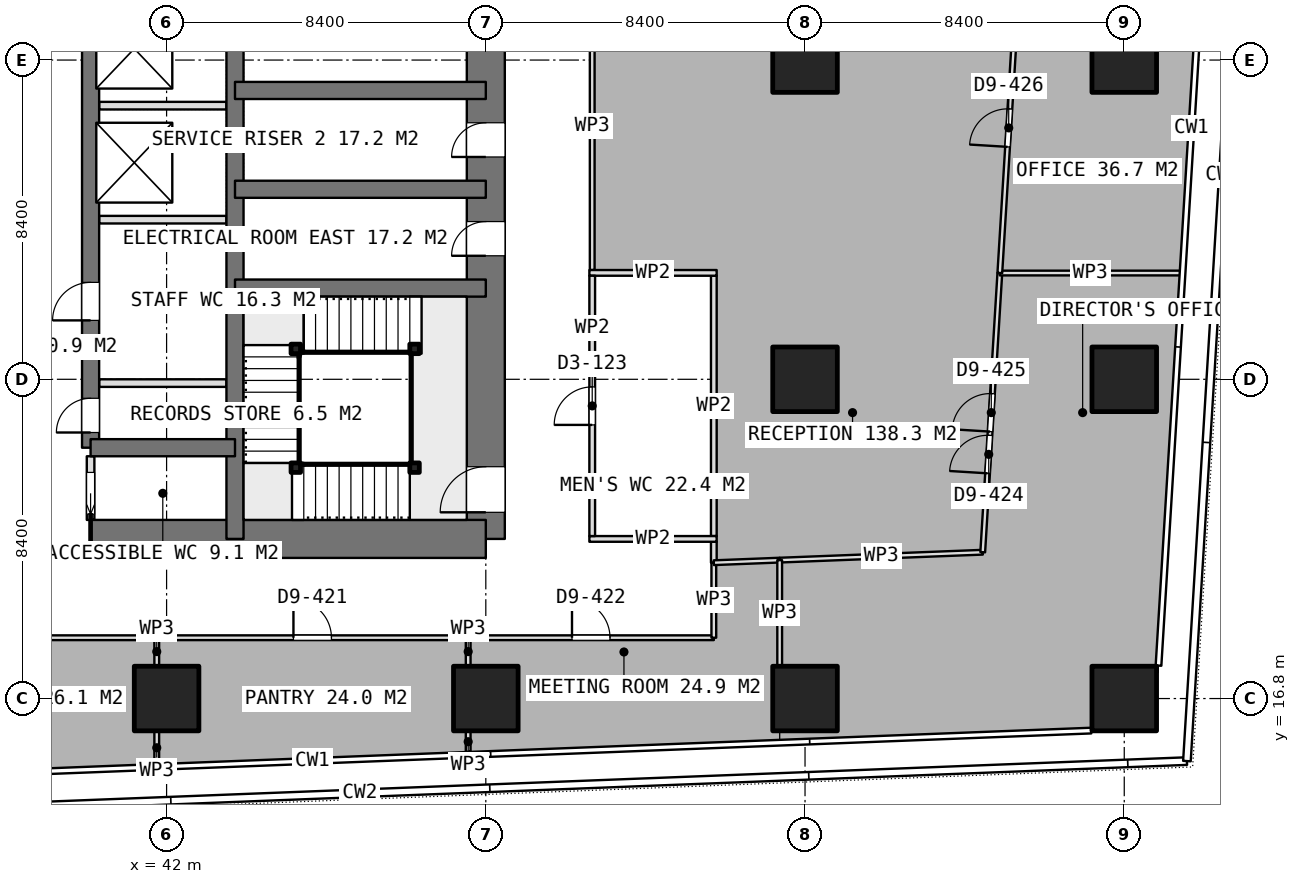
"""IFC4 building model, lengths in metres.
Left out: names, types, materials, properties, quantities, classifications, styles, units other than length and angle.
Written with IfcOpenShell. Run it as: python <this file> out.ifc"""

import sys

from ifc_helpers import new_model, si_unit, direction, frame, frame_2d, origin, origin_2d, place, context, subcontext, project, spatial, rectangle, extrude, element, fill, save


model = new_model("IFC4")
c1 = context("Model", 3, precision=1e-05, world=origin(), true_north=direction((0.0, 1.0)))
c2 = subcontext(c1, "Body", "Model", "MODEL_VIEW")
j1 = project(units=[si_unit("LENGTHUNIT", "METRE"), si_unit("PLANEANGLEUNIT", "RADIAN")], contexts=[c1])
p1 = place(None, origin())
s1 = spatial("IfcSite", under=j1, at=p1, CompositionType="ELEMENT")
p2 = place(p1, origin())
s2 = spatial("IfcBuilding", under=s1, at=p2, CompositionType="ELEMENT")
p3 = place(p2, frame((0.0, 0.0, 117.8)))
s3 = spatial("IfcBuildingStorey", under=s2, at=p3, CompositionType="ELEMENT", Elevation=117.8)
p4 = place(p3, frame((40.0, 21.0, 0.0), z_axis=(0.0, 0.0, 1.0), x_axis=(1.0, 0.0, 0.0)))
e1 = element("IfcWall", 1, at=p4, inside=s3, PredefinedType="SHEAR", context=c2, shape_type="SweptSolid", body=[
    extrude(rectangle(XDim=10.4, YDim=1.0, at=frame_2d((5.2, 0.0))), origin(), (0.0, 0.0, 1.0), 3.75),
])
p5 = place(p3, frame((50.4, 21.0, 0.0), z_axis=(0.0, 0.0, 1.0), x_axis=(0.0, 1.0, 0.0)))
e2 = element("IfcWall", 2, at=p5, inside=s3, PredefinedType="SHEAR", context=c2, shape_type="SweptSolid", body=[
    extrude(rectangle(XDim=25.2, YDim=1.0, at=frame_2d((12.6, 0.0))), origin(), (0.0, 0.0, 1.0), 3.75),
])
p6 = place(p5, frame((16.2, 0.0, 0.0)))
e3 = element("IfcOpeningElement", 3, at=p6, cuts=e2, PredefinedType="OPENING", context=c2, shape_type="SweptSolid", body=[
    extrude(rectangle(XDim=1.2, YDim=2.1, at=frame_2d((0.6, 1.05))), frame((0.0, 0.51, 0.0), z_axis=(0.0, -1.0, 0.0), x_axis=(1.0, 0.0, 0.0)), (0.0, 0.0, 1.0), 1.02),
])
p7 = place(p5, frame((10.05, 0.0, 0.0)))
e4 = element("IfcOpeningElement", 4, at=p7, cuts=e2, PredefinedType="OPENING", context=c2, shape_type="SweptSolid", body=[
    extrude(rectangle(XDim=0.9, YDim=2.1, at=frame_2d((0.45, 1.05))), frame((0.0, 0.51, 0.0), z_axis=(0.0, -1.0, 0.0), x_axis=(1.0, 0.0, 0.0)), (0.0, 0.0, 1.0), 1.02),
])
p8 = place(p5, frame((7.45, 0.0, 0.0)))
e5 = element("IfcOpeningElement", 5, at=p8, cuts=e2, PredefinedType="OPENING", context=c2, shape_type="SweptSolid", body=[
    extrude(rectangle(XDim=0.9, YDim=2.1, at=frame_2d((0.45, 1.05))), frame((0.0, 0.51, 0.0), z_axis=(0.0, -1.0, 0.0), x_axis=(1.0, 0.0, 0.0)), (0.0, 0.0, 1.0), 1.02),
])
p9 = place(p5, frame((0.7, 0.0, 0.0)))
e6 = element("IfcOpeningElement", 6, at=p9, cuts=e2, PredefinedType="OPENING", context=c2, shape_type="SweptSolid", body=[
    extrude(rectangle(XDim=1.2, YDim=2.1, at=frame_2d((0.6, 1.05))), frame((0.0, 0.51, 0.0), z_axis=(0.0, -1.0, 0.0), x_axis=(1.0, 0.0, 0.0)), (0.0, 0.0, 1.0), 1.02),
])
p10 = place(p3, frame((43.8, 21.0, 0.0), z_axis=(0.0, 0.0, 1.0), x_axis=(0.0, 1.0, 0.0)))
e7 = element("IfcWall", 7, at=p10, inside=s3, PredefinedType="SHEAR", context=c2, shape_type="SweptSolid", body=[
    extrude(rectangle(XDim=25.2, YDim=0.45, at=frame_2d((12.6, 0.0))), origin(), (0.0, 0.0, 1.0), 3.75),
])
p11 = place(p3, frame((40.0, 23.4, 0.0), z_axis=(0.0, 0.0, 1.0), x_axis=(0.0, 1.0, 0.0)))
e8 = element("IfcWall", 8, at=p11, inside=s3, PredefinedType="SHEAR", context=c2, shape_type="SweptSolid", body=[
    extrude(rectangle(XDim=18.0, YDim=0.45, at=frame_2d((9.0, 0.0))), origin(), (0.0, 0.0, 1.0), 3.75),
])
p12 = place(p11, frame((0.4, 0.0, 0.0)))
e9 = element("IfcOpeningElement", 9, at=p12, cuts=e8, PredefinedType="OPENING", context=c2, shape_type="SweptSolid", body=[
    extrude(rectangle(XDim=0.9, YDim=2.1, at=frame_2d((0.45, 1.05))), frame((0.0, 0.235, 0.0), z_axis=(0.0, -1.0, 0.0), x_axis=(1.0, 0.0, 0.0)), (0.0, 0.0, 1.0), 0.47),
])
p13 = place(p11, frame((3.35, 0.0, 0.0)))
e10 = element("IfcOpeningElement", 10, at=p13, cuts=e8, PredefinedType="OPENING", context=c2, shape_type="SweptSolid", body=[
    extrude(rectangle(XDim=1.0, YDim=2.1, at=frame_2d((0.5, 1.05))), frame((0.0, 0.235, 0.0), z_axis=(0.0, -1.0, 0.0), x_axis=(1.0, 0.0, 0.0)), (0.0, 0.0, 1.0), 0.47),
])
p14 = place(p3, frame((40.0, 23.4, 0.0), z_axis=(0.0, 0.0, 1.0), x_axis=(1.0, 0.0, 0.0)))
e11 = element("IfcWall", 11, at=p14, inside=s3, PredefinedType="SHEAR", context=c2, shape_type="SweptSolid", body=[
    extrude(rectangle(XDim=3.8, YDim=0.45, at=frame_2d((1.9, 0.0))), origin(), (0.0, 0.0, 1.0), 3.75),
])
for number, where, z_axis, x_axis in (
    (12, (43.8, 27.6, 0.0), (0.0, 0.0, 1.0), (1.0, 0.0, 0.0)),
    (13, (43.8, 30.2, 0.0), (0.0, 0.0, 1.0), (1.0, 0.0, 0.0)),
    (14, (43.8, 32.8, 0.0), (0.0, 0.0, 1.0), (1.0, 0.0, 0.0)),
):
    element("IfcWall", number, at=place(p3, frame(where, z_axis=z_axis, x_axis=x_axis)), inside=s3, PredefinedType="SHEAR", context=c2, shape_type="SweptSolid", body=[
        extrude(rectangle(XDim=6.6, YDim=0.45, at=frame_2d((3.3, 0.0))), origin(), (0.0, 0.0, 1.0), 3.75),
    ])
for number, where, z_axis, x_axis in (
    (15, (42.0, 16.8, 0.0), (0.0, 0.0, 1.0), (1.0, 0.0, 0.0)),
    (16, (50.4, 16.8, 0.0), (0.0, 0.0, 1.0), (1.0, 0.0, 0.0)),
    (17, (58.8, 16.8, 0.0), (0.0, 0.0, 1.0), (1.0, 0.0, 0.0)),
    (18, (58.8, 25.2, 0.0), (0.0, 0.0, 1.0), (1.0, 0.0, 0.0)),
    (19, (58.8, 33.6, 0.0), (0.0, 0.0, 1.0), (1.0, 0.0, 0.0)),
    (20, (67.2, 16.8, 0.0), (0.0, 0.0, 1.0), (1.0, 0.0, 0.0)),
    (21, (67.2, 25.2, 0.0), (0.0, 0.0, 1.0), (1.0, 0.0, 0.0)),
    (22, (67.2, 33.6, 0.0), (0.0, 0.0, 1.0), (1.0, 0.0, 0.0)),
):
    element("IfcColumn", number, at=place(p3, frame(where, z_axis=z_axis, x_axis=x_axis)), inside=s3, PredefinedType="COLUMN", context=c2, shape_type="SweptSolid", body=[
        extrude(rectangle(XDim=1.7, YDim=1.7, at=origin_2d()), origin(), (0.0, 0.0, 1.0), 3.75),
    ])
for number, where, z_axis, x_axis in (
    (23, (40.225, 29.4, 0.0), (0.0, 0.0, 1.0), (1.0, 0.0, 0.0)),
    (24, (40.225, 32.4, 0.0), (0.0, 0.0, 1.0), (1.0, 0.0, 0.0)),
):
    element("IfcWall", number, at=place(p3, frame(where, z_axis=z_axis, x_axis=x_axis)), inside=s3, PredefinedType="PARTITIONING", context=c2, shape_type="SweptSolid", body=[
        extrude(rectangle(XDim=3.35, YDim=0.2, at=frame_2d((1.675, 0.0))), origin(), (0.0, 0.0, 1.0), 3.5),
    ])
p15 = place(p3, frame((40.0, 21.5, 0.0), z_axis=(0.0, 0.0, 1.0), x_axis=(0.0, 1.0, 0.0)))
e25 = element("IfcWall", 25, at=p15, inside=s3, PredefinedType="PARTITIONING", context=c2, shape_type="SweptSolid", body=[
    extrude(rectangle(XDim=1.675, YDim=0.2, at=frame_2d((0.837, 0.0))), origin(), (0.0, 0.0, 1.0), 3.5),
])
p16 = place(p15, frame((0.15, 0.0, 0.0)))
e26 = element("IfcOpeningElement", 26, at=p16, cuts=e25, PredefinedType="OPENING", context=c2, shape_type="SweptSolid", body=[
    extrude(rectangle(XDim=1.1, YDim=2.1, at=frame_2d((0.55, 1.05))), frame((0.0, 0.11, 0.0), z_axis=(0.0, -1.0, 0.0), x_axis=(1.0, 0.0, 0.0)), (0.0, 0.0, 1.0), 0.22),
])
p17 = place(p3, frame((40.225, 25.1, 0.0), z_axis=(0.0, 0.0, 1.0), x_axis=(1.0, 0.0, 0.0)))
e27 = element("IfcWall", 27, at=p17, inside=s3, PredefinedType="PARTITIONING", context=c2, shape_type="SweptSolid", body=[
    extrude(rectangle(XDim=3.35, YDim=0.2, at=frame_2d((1.675, 0.0))), origin(), (0.0, 0.0, 1.0), 3.5),
])
for number, where, z_axis, x_axis in (
    (28, (53.125, 21.0, 0.0), (0.0, 0.0, 1.0), (1.0, 0.0, 0.0)),
    (29, (53.125, 28.0, 0.0), (0.0, 0.0, 1.0), (1.0, 0.0, 0.0)),
):
    element("IfcWall", number, at=place(p3, frame(where, z_axis=z_axis, x_axis=x_axis)), inside=s3, PredefinedType="PARTITIONING", context=c2, shape_type="SweptSolid", body=[
        extrude(rectangle(XDim=3.35, YDim=0.15, at=frame_2d((1.675, 0.0))), origin(), (0.0, 0.0, 1.0), 3.5),
    ])
p18 = place(p3, frame((53.2, 21.075, 0.0), z_axis=(0.0, 0.0, 1.0), x_axis=(0.0, 1.0, 0.0)))
e30 = element("IfcWall", 30, at=p18, inside=s3, PredefinedType="PARTITIONING", context=c2, shape_type="SweptSolid", body=[
    extrude(rectangle(XDim=6.85, YDim=0.15, at=frame_2d((3.425, 0.0))), origin(), (0.0, 0.0, 1.0), 3.5),
])
p19 = place(p18, frame((2.925, 0.0, 0.0)))
e31 = element("IfcOpeningElement", 31, at=p19, cuts=e30, PredefinedType="OPENING", context=c2, shape_type="SweptSolid", body=[
    extrude(rectangle(XDim=1.0, YDim=2.1, at=frame_2d((0.5, 1.05))), frame((0.0, 0.085, 0.0), z_axis=(0.0, -1.0, 0.0), x_axis=(1.0, 0.0, 0.0)), (0.0, 0.0, 1.0), 0.17),
])
p20 = place(p3, frame((56.4, 21.075, 0.0), z_axis=(0.0, 0.0, 1.0), x_axis=(0.0, 1.0, 0.0)))
e32 = element("IfcWall", 32, at=p20, inside=s3, PredefinedType="PARTITIONING", context=c2, shape_type="SweptSolid", body=[
    extrude(rectangle(XDim=6.85, YDim=0.15, at=frame_2d((3.425, 0.0))), origin(), (0.0, 0.0, 1.0), 3.5),
])
p21 = place(p3, frame((41.741, 18.4, 0.0), z_axis=(0.0, 0.0, 1.0), x_axis=(1.0, 0.0, 0.0)))
e33 = element("IfcWall", 33, at=p21, inside=s3, PredefinedType="PARTITIONING", context=c2, shape_type="SweptSolid", body=[
    extrude(rectangle(XDim=8.195, YDim=0.125, at=frame_2d((4.098, 0.0))), origin(), (0.0, 0.0, 1.0), 3.5),
])
p22 = place(p21, frame((3.597, 0.0, 0.0)))
e34 = element("IfcOpeningElement", 34, at=p22, cuts=e33, PredefinedType="OPENING", context=c2, shape_type="SweptSolid", body=[
    extrude(rectangle(XDim=1.0, YDim=2.1, at=frame_2d((0.5, 1.05))), frame((0.0, 0.073, 0.0), z_axis=(0.0, -1.0, 0.0), x_axis=(1.0, 0.0, 0.0)), (0.0, 0.0, 1.0), 0.145),
])
p23 = place(p3, frame((49.936, 18.4, 0.0), z_axis=(0.0, 0.0, 1.0), x_axis=(0.0, -1.0, 0.0)))
e35 = element("IfcWall", 35, at=p23, inside=s3, PredefinedType="PARTITIONING", context=c2, shape_type="SweptSolid", body=[
    extrude(rectangle(XDim=0.73, YDim=0.125, at=frame_2d((0.365, 0.0))), origin(), (0.0, 0.0, 1.0), 3.5),
])
p24 = place(p3, frame((49.936, 15.93, 0.0), z_axis=(0.0, 0.0, 1.0), x_axis=(0.0, -1.0, 0.0)))
e36 = element("IfcWall", 36, at=p24, inside=s3, PredefinedType="PARTITIONING", context=c2, shape_type="SweptSolid", body=[
    extrude(rectangle(XDim=0.531, YDim=0.125, at=frame_2d((0.266, 0.0))), origin(), (0.0, 0.0, 1.0), 3.5),
])
p25 = place(p3, frame((41.741, 15.08, 0.0), z_axis=(0.0, 0.0, 1.0), x_axis=(0.0, 1.0, 0.0)))
e37 = element("IfcWall", 37, at=p25, inside=s3, PredefinedType="PARTITIONING", context=c2, shape_type="SweptSolid", body=[
    extrude(rectangle(XDim=0.85, YDim=0.125, at=frame_2d((0.425, 0.0))), origin(), (0.0, 0.0, 1.0), 3.5),
])
p26 = place(p3, frame((41.741, 17.67, 0.0), z_axis=(0.0, 0.0, 1.0), x_axis=(0.0, 1.0, 0.0)))
e38 = element("IfcWall", 38, at=p26, inside=s3, PredefinedType="PARTITIONING", context=c2, shape_type="SweptSolid", body=[
    extrude(rectangle(XDim=0.73, YDim=0.125, at=frame_2d((0.365, 0.0))), origin(), (0.0, 0.0, 1.0), 3.5),
])
p27 = place(p3, frame((49.937, 18.4, 0.0), z_axis=(0.0, 0.0, 1.0), x_axis=(1.0, 0.0, 0.0)))
e39 = element("IfcWall", 39, at=p27, inside=s3, PredefinedType="PARTITIONING", context=c2, shape_type="SweptSolid", body=[
    extrude(rectangle(XDim=6.463, YDim=0.125, at=frame_2d((3.231, 0.0))), origin(), (0.0, 0.0, 1.0), 3.5),
])
p28 = place(p27, frame((2.731, 0.0, 0.0)))
e40 = element("IfcOpeningElement", 40, at=p28, cuts=e39, PredefinedType="OPENING", context=c2, shape_type="SweptSolid", body=[
    extrude(rectangle(XDim=1.0, YDim=2.1, at=frame_2d((0.5, 1.05))), frame((0.0, 0.073, 0.0), z_axis=(0.0, -1.0, 0.0), x_axis=(1.0, 0.0, 0.0)), (0.0, 0.0, 1.0), 0.145),
])
p29 = place(p3, frame((56.4, 18.4, 0.0), z_axis=(0.0, 0.0, 1.0), x_axis=(0.0, 1.0, 0.0)))
e41 = element("IfcWall", 41, at=p29, inside=s3, PredefinedType="PARTITIONING", context=c2, shape_type="SweptSolid", body=[
    extrude(rectangle(XDim=1.974, YDim=0.125, at=frame_2d((0.987, 0.0))), origin(), (0.0, 0.0, 1.0), 3.5),
])
p30 = place(p3, frame((56.4, 20.374, 0.0), z_axis=(0.0, 0.0, 1.0), x_axis=(0.999234110548, 0.039130452561, 0.0)))
e42 = element("IfcWall", 42, at=p30, inside=s3, PredefinedType="PARTITIONING", context=c2, shape_type="SweptSolid", body=[
    extrude(rectangle(XDim=1.734, YDim=0.125, at=frame_2d((0.867, 0.0))), origin(), (0.0, 0.0, 1.0), 3.5),
])
p31 = place(p3, frame((58.133, 20.442, 0.0), z_axis=(0.0, 0.0, 1.0), x_axis=(0.0, -1.0, 0.0)))
e43 = element("IfcWall", 43, at=p31, inside=s3, PredefinedType="PARTITIONING", context=c2, shape_type="SweptSolid", body=[
    extrude(rectangle(XDim=2.772, YDim=0.125, at=frame_2d((1.386, 0.0))), origin(), (0.0, 0.0, 1.0), 3.5),
])
p32 = place(p3, frame((58.134, 20.442, 0.0), z_axis=(0.0, 0.0, 1.0), x_axis=(0.999242781249, 0.03890840682, 0.0)))
e44 = element("IfcWall", 44, at=p32, inside=s3, PredefinedType="PARTITIONING", context=c2, shape_type="SweptSolid", body=[
    extrude(rectangle(XDim=5.346, YDim=0.125, at=frame_2d((2.673, 0.0))), origin(), (0.0, 0.0, 1.0), 3.5),
])
p33 = place(p3, frame((63.476, 20.65, 0.0), z_axis=(0.0, 0.0, 1.0), x_axis=(0.061135017565, 0.998129505439, 0.0)))
e45 = element("IfcWall", 45, at=p33, inside=s3, PredefinedType="PARTITIONING", context=c2, shape_type="SweptSolid", body=[
    extrude(rectangle(XDim=7.36, YDim=0.125, at=frame_2d((3.68, 0.0))), origin(), (0.0, 0.0, 1.0), 3.5),
])
p34 = place(p33, frame((3.18, 0.0, 0.0)))
e46 = element("IfcOpeningElement", 46, at=p34, cuts=e45, PredefinedType="OPENING", context=c2, shape_type="SweptSolid", body=[
    extrude(rectangle(XDim=1.0, YDim=2.1, at=frame_2d((0.5, 1.05))), frame((0.0, 0.073, 0.0), z_axis=(0.0, -1.0, 0.0), x_axis=(1.0, 0.0, 0.0)), (0.0, 0.0, 1.0), 0.145),
])
p35 = place(p33, frame((2.08, 0.0, 0.0)))
e47 = element("IfcOpeningElement", 47, at=p35, cuts=e45, PredefinedType="OPENING", context=c2, shape_type="SweptSolid", body=[
    extrude(rectangle(XDim=1.0, YDim=2.1, at=frame_2d((0.5, 1.05))), frame((0.0, 0.073, 0.0), z_axis=(0.0, -1.0, 0.0), x_axis=(1.0, 0.0, 0.0)), (0.0, 0.0, 1.0), 0.145),
])
p36 = place(p3, frame((63.926, 27.996, 0.0), z_axis=(0.0, 0.0, 1.0), x_axis=(1.0, 0.0, 0.0)))
e48 = element("IfcWall", 48, at=p36, inside=s3, PredefinedType="PARTITIONING", context=c2, shape_type="SweptSolid", body=[
    extrude(rectangle(XDim=4.758, YDim=0.125, at=frame_2d((2.379, 0.0))), origin(), (0.0, 0.0, 1.0), 3.5),
])
p37 = place(p3, frame((63.926, 27.997, 0.0), z_axis=(0.0, 0.0, 1.0), x_axis=(0.061176245149, 0.998126979412, 0.0)))
e49 = element("IfcWall", 49, at=p37, inside=s3, PredefinedType="PARTITIONING", context=c2, shape_type="SweptSolid", body=[
    extrude(rectangle(XDim=7.65, YDim=0.125, at=frame_2d((3.825, 0.0))), origin(), (0.0, 0.0, 1.0), 3.5),
])
p38 = place(p37, frame((3.325, 0.0, 0.0)))
e50 = element("IfcOpeningElement", 50, at=p38, cuts=e49, PredefinedType="OPENING", context=c2, shape_type="SweptSolid", body=[
    extrude(rectangle(XDim=1.0, YDim=2.1, at=frame_2d((0.5, 1.05))), frame((0.0, 0.073, 0.0), z_axis=(0.0, -1.0, 0.0), x_axis=(1.0, 0.0, 0.0)), (0.0, 0.0, 1.0), 0.145),
])
p39 = place(p3, frame((53.2, 28.075, 0.0), z_axis=(0.0, 0.0, 1.0), x_axis=(0.0, 1.0, 0.0)))
e51 = element("IfcWall", 51, at=p39, inside=s3, PredefinedType="PARTITIONING", context=c2, shape_type="SweptSolid", body=[
    extrude(rectangle(XDim=7.558, YDim=0.125, at=frame_2d((3.779, 0.0))), origin(), (0.0, 0.0, 1.0), 3.5),
])
p40 = place(p3, frame((56.4, 20.374, 0.0), z_axis=(0.0, 0.0, 1.0), x_axis=(0.0, 1.0, 0.0)))
e52 = element("IfcWall", 52, at=p40, inside=s3, PredefinedType="PARTITIONING", context=c2, shape_type="SweptSolid", body=[
    extrude(rectangle(XDim=0.551, YDim=0.15, at=frame_2d((0.275, 0.0))), origin(), (0.0, 0.0, 1.0), 3.5),
])
p41 = place(p3, frame((33.826, 18.4, 0.0), z_axis=(0.0, 0.0, 1.0), x_axis=(1.0, 0.0, 0.0)))
e53 = element("IfcWall", 53, at=p41, inside=s3, PredefinedType="PARTITIONING", context=c2, shape_type="SweptSolid", body=[
    extrude(rectangle(XDim=7.914, YDim=0.125, at=frame_2d((3.957, 0.0))), origin(), (0.0, 0.0, 1.0), 3.5),
])
p42 = place(p41, frame((3.457, 0.0, 0.0)))
e54 = element("IfcOpeningElement", 54, at=p42, cuts=e53, PredefinedType="OPENING", context=c2, shape_type="SweptSolid", body=[
    extrude(rectangle(XDim=1.0, YDim=2.1, at=frame_2d((0.5, 1.05))), frame((0.0, 0.073, 0.0), z_axis=(0.0, -1.0, 0.0), x_axis=(1.0, 0.0, 0.0)), (0.0, 0.0, 1.0), 0.145),
])
for number, where, z_axis, x_axis in (
    (55, (48.525, 22.875, 0.0), (0.0, 0.0, 1.0), (1.0, 0.0, 0.0)),
    (56, (45.4, 22.875, 0.0), (0.0, 0.0, 1.0), (1.0, 0.0, 0.0)),
    (57, (45.4, 26.0, 0.0), (0.0, 0.0, 1.0), (1.0, 0.0, 0.0)),
    (58, (48.525, 26.0, 0.0), (0.0, 0.0, 1.0), (1.0, 0.0, 0.0)),
):
    element("IfcColumn", number, at=place(p3, frame(where, z_axis=z_axis, x_axis=x_axis)), inside=s3, PredefinedType="COLUMN", context=c2, shape_type="SweptSolid", body=[
        extrude(rectangle(XDim=0.25, YDim=0.25, at=origin_2d()), origin(), (0.0, 0.0, 1.0), 3.75),
    ])
p43 = place(p7, origin())
e59 = element("IfcDoor", 59, at=p43, inside=s3, OperationType="SINGLE_SWING_LEFT", PredefinedType="DOOR", context=c2, shape_type="SweptSolid", body=[
    extrude(rectangle(XDim=0.9, YDim=2.1, at=frame_2d((0.45, 1.05))), frame((0.0, 0.025, 0.0), z_axis=(0.0, -1.0, 0.0), x_axis=(1.0, 0.0, 0.0)), (0.0, 0.0, 1.0), 0.05),
])
fill(e4, e59)
p44 = place(p8, origin())
e60 = element("IfcDoor", 60, at=p44, inside=s3, OperationType="SINGLE_SWING_LEFT", PredefinedType="DOOR", context=c2, shape_type="SweptSolid", body=[
    extrude(rectangle(XDim=0.9, YDim=2.1, at=frame_2d((0.45, 1.05))), frame((0.0, 0.025, 0.0), z_axis=(0.0, -1.0, 0.0), x_axis=(1.0, 0.0, 0.0)), (0.0, 0.0, 1.0), 0.05),
])
fill(e5, e60)
p45 = place(p16, origin())
e61 = element("IfcDoor", 61, at=p45, inside=s3, OperationType="SLIDING_TO_LEFT", PredefinedType="DOOR", context=c2, shape_type="SweptSolid", body=[
    extrude(rectangle(XDim=1.1, YDim=2.1, at=frame_2d((0.55, 1.05))), frame((0.0, 0.025, 0.0), z_axis=(0.0, -1.0, 0.0), x_axis=(1.0, 0.0, 0.0)), (0.0, 0.0, 1.0), 0.05),
])
fill(e26, e61)
p46 = place(p12, origin())
e62 = element("IfcDoor", 62, at=p46, inside=s3, OperationType="SINGLE_SWING_LEFT", PredefinedType="DOOR", context=c2, shape_type="SweptSolid", body=[
    extrude(rectangle(XDim=0.9, YDim=2.1, at=frame_2d((0.45, 1.05))), frame((0.0, 0.025, 0.0), z_axis=(0.0, -1.0, 0.0), x_axis=(1.0, 0.0, 0.0)), (0.0, 0.0, 1.0), 0.05),
])
fill(e9, e62)
p47 = place(p13, origin())
e63 = element("IfcDoor", 63, at=p47, inside=s3, OperationType="SINGLE_SWING_LEFT", PredefinedType="DOOR", context=c2, shape_type="SweptSolid", body=[
    extrude(rectangle(XDim=1.0, YDim=2.1, at=frame_2d((0.5, 1.05))), frame((0.0, 0.025, 0.0), z_axis=(0.0, -1.0, 0.0), x_axis=(1.0, 0.0, 0.0)), (0.0, 0.0, 1.0), 0.05),
])
fill(e10, e63)
p48 = place(p19, origin())
e64 = element("IfcDoor", 64, at=p48, inside=s3, OperationType="SINGLE_SWING_LEFT", PredefinedType="DOOR", context=c2, shape_type="SweptSolid", body=[
    extrude(rectangle(XDim=1.0, YDim=2.1, at=frame_2d((0.5, 1.05))), frame((0.0, 0.025, 0.0), z_axis=(0.0, -1.0, 0.0), x_axis=(1.0, 0.0, 0.0)), (0.0, 0.0, 1.0), 0.05),
])
fill(e31, e64)
p49 = place(p22, origin())
e65 = element("IfcDoor", 65, at=p49, inside=s3, OperationType="SINGLE_SWING_LEFT", PredefinedType="DOOR", context=c2, shape_type="SweptSolid", body=[
    extrude(rectangle(XDim=1.0, YDim=2.1, at=frame_2d((0.5, 1.05))), frame((0.0, 0.025, 0.0), z_axis=(0.0, -1.0, 0.0), x_axis=(1.0, 0.0, 0.0)), (0.0, 0.0, 1.0), 0.05),
])
fill(e34, e65)
p50 = place(p28, origin())
e66 = element("IfcDoor", 66, at=p50, inside=s3, OperationType="SINGLE_SWING_LEFT", PredefinedType="DOOR", context=c2, shape_type="SweptSolid", body=[
    extrude(rectangle(XDim=1.0, YDim=2.1, at=frame_2d((0.5, 1.05))), frame((0.0, 0.025, 0.0), z_axis=(0.0, -1.0, 0.0), x_axis=(1.0, 0.0, 0.0)), (0.0, 0.0, 1.0), 0.05),
])
fill(e40, e66)
p51 = place(p34, origin())
e67 = element("IfcDoor", 67, at=p51, inside=s3, OperationType="SINGLE_SWING_LEFT", PredefinedType="DOOR", context=c2, shape_type="SweptSolid", body=[
    extrude(rectangle(XDim=1.0, YDim=2.1, at=frame_2d((0.5, 1.05))), frame((0.0, 0.025, 0.0), z_axis=(0.0, -1.0, 0.0), x_axis=(1.0, 0.0, 0.0)), (0.0, 0.0, 1.0), 0.05),
])
fill(e46, e67)
p52 = place(p38, origin())
e68 = element("IfcDoor", 68, at=p52, inside=s3, OperationType="SINGLE_SWING_LEFT", PredefinedType="DOOR", context=c2, shape_type="SweptSolid", body=[
    extrude(rectangle(XDim=1.0, YDim=2.1, at=frame_2d((0.5, 1.05))), frame((0.0, 0.025, 0.0), z_axis=(0.0, -1.0, 0.0), x_axis=(1.0, 0.0, 0.0)), (0.0, 0.0, 1.0), 0.05),
])
fill(e50, e68)
p53 = place(p35, origin())
e69 = element("IfcDoor", 69, at=p53, inside=s3, OperationType="SINGLE_SWING_LEFT", PredefinedType="DOOR", context=c2, shape_type="SweptSolid", body=[
    extrude(rectangle(XDim=1.0, YDim=2.1, at=frame_2d((0.5, 1.05))), frame((0.0, 0.025, 0.0), z_axis=(0.0, -1.0, 0.0), x_axis=(1.0, 0.0, 0.0)), (0.0, 0.0, 1.0), 0.05),
])
fill(e47, e69)
p54 = place(p9, origin())
e70 = element("IfcDoor", 70, at=p54, inside=s3, OperationType="SINGLE_SWING_RIGHT", PredefinedType="DOOR", context=c2, shape_type="SweptSolid", body=[
    extrude(rectangle(XDim=1.2, YDim=2.1, at=frame_2d((0.6, 1.05))), frame((0.0, 0.025, 0.0), z_axis=(0.0, -1.0, 0.0), x_axis=(1.0, 0.0, 0.0)), (0.0, 0.0, 1.0), 0.05),
])
fill(e6, e70)
save(model, sys.argv[1])
